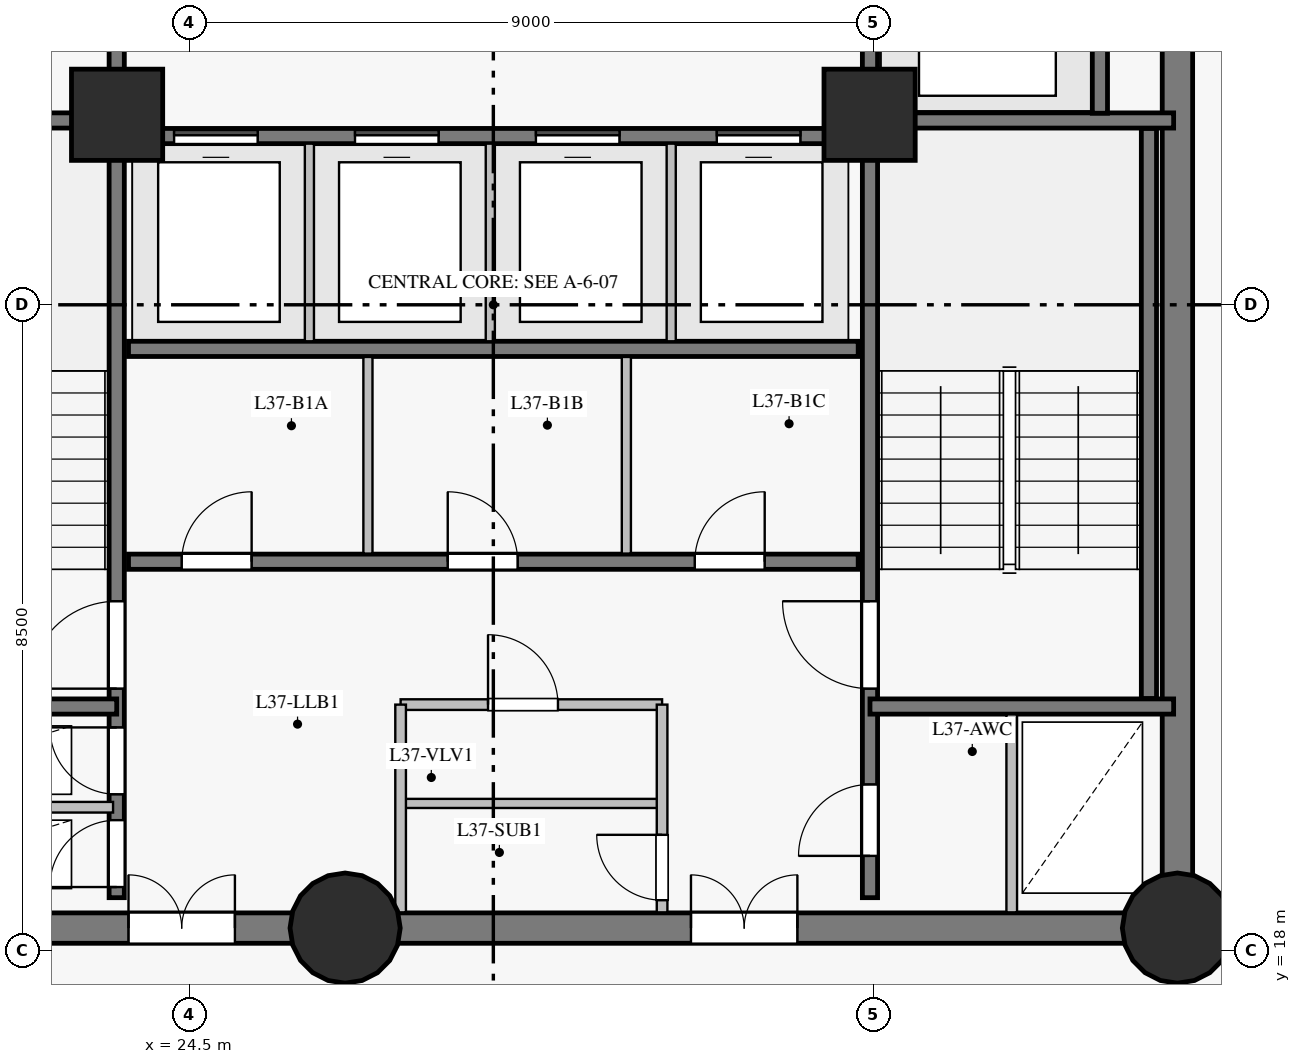
"""IFC4 building model, lengths in metres.
Left out: names, types, materials, properties, quantities, classifications, styles, units other than length and angle.
Written with IfcOpenShell. Run it as: python <this file> out.ifc"""

import sys

from ifc_helpers import new_model, si_unit, direction, frame, frame_2d, origin, origin_with_axes, origin_2d, place, context, subcontext, project, spatial, rectangle, circle, extrude, source, transform, mapped, element, fill, save


model = new_model("IFC4")
c1 = context("Model", 3, precision=1e-05, world=origin(), true_north=direction((0.0, 1.0)))
c2 = subcontext(c1, "Body", "Model", "MODEL_VIEW")
j1 = project(units=[si_unit("LENGTHUNIT", "METRE"), si_unit("PLANEANGLEUNIT", "RADIAN")], contexts=[c1])
p1 = place(None, origin())
s1 = spatial("IfcSite", under=j1, at=p1, CompositionType="ELEMENT")
p2 = place(p1, origin())
s2 = spatial("IfcBuilding", under=s1, at=p2, CompositionType="ELEMENT")
p3 = place(p2, frame((0.0, 0.0, 132.8)))
s3 = spatial("IfcBuildingStorey", under=s2, at=p3, CompositionType="ELEMENT", Elevation=132.8)
p4 = place(p3, frame((19.5, 18.3, 0.0), z_axis=(0.0, 0.0, 1.0), x_axis=(1.0, 0.0, 0.0)))
e1 = element("IfcWall", 1, at=p4, inside=s3, PredefinedType="SHEAR", context=c2, shape_type="SweptSolid", body=[
    extrude(rectangle(XDim=7.05, YDim=0.4, at=frame_2d((3.525, 0.0))), origin(), (0.0, 0.0, 1.0), 2.825),
])
p5 = place(p4, frame((4.2, 0.0, 0.0)))
e2 = element("IfcOpeningElement", 2, at=p5, cuts=e1, PredefinedType="OPENING", context=c2, shape_type="SweptSolid", body=[
    extrude(rectangle(XDim=1.4, YDim=2.2, at=frame_2d((0.7, 1.1))), frame((0.0, 0.21, 0.0), z_axis=(0.0, -1.0, 0.0), x_axis=(1.0, 0.0, 0.0)), (0.0, 0.0, 1.0), 0.42),
])
p6 = place(p3, frame((26.55, 18.3, 0.0), z_axis=(0.0, 0.0, 1.0), x_axis=(1.0, 0.0, 0.0)))
e3 = element("IfcWall", 3, at=p6, inside=s3, PredefinedType="SHEAR", context=c2, shape_type="SweptSolid", body=[
    extrude(rectangle(XDim=10.95, YDim=0.4, at=frame_2d((5.475, 0.0))), origin(), (0.0, 0.0, 1.0), 2.825),
])
p7 = place(p6, frame((4.55, 0.0, 0.0)))
e4 = element("IfcOpeningElement", 4, at=p7, cuts=e3, PredefinedType="OPENING", context=c2, shape_type="SweptSolid", body=[
    extrude(rectangle(XDim=1.4, YDim=2.2, at=frame_2d((0.7, 1.1))), frame((0.0, 0.21, 0.0), z_axis=(0.0, -1.0, 0.0), x_axis=(1.0, 0.0, 0.0)), (0.0, 0.0, 1.0), 0.42),
])
p8 = place(p3, frame((37.5, 18.3, 0.0), z_axis=(0.0, 0.0, 1.0), x_axis=(0.0, 1.0, 0.0)))
e5 = element("IfcWall", 5, at=p8, inside=s3, PredefinedType="SHEAR", context=c2, shape_type="SweptSolid", body=[
    extrude(rectangle(XDim=16.4, YDim=0.4, at=frame_2d((8.2, 0.0))), origin(), (0.0, 0.0, 1.0), 2.825),
])
p9 = place(p8, frame((14.15, 0.0, 0.0)))
e6 = element("IfcOpeningElement", 6, at=p9, cuts=e5, PredefinedType="OPENING", context=c2, shape_type="SweptSolid", body=[
    extrude(rectangle(XDim=1.2, YDim=2.15, at=frame_2d((0.6, 1.075))), frame((0.0, 0.21, 0.0), z_axis=(0.0, -1.0, 0.0), x_axis=(1.0, 0.0, 0.0)), (0.0, 0.0, 1.0), 0.42),
])
m1 = source(origin_with_axes(), c2, "Body", "SweptSolid", [
    extrude(circle(Radius=0.725, at=origin_2d()), origin(), (0.0, 0.0, 1.0), 3.05),
])
for number, where, z_axis, x_axis in (
    (7, (26.55, 18.3, 0.0), (0.0, 0.0, 1.0), (1.0, 0.0, 0.0)),
    (8, (37.5, 18.3, 0.0), (0.0, 0.0, 1.0), (1.0, 0.0, 0.0)),
):
    element("IfcColumn", number, at=place(p3, frame(where, z_axis=z_axis, x_axis=x_axis)), inside=s3, PredefinedType="COLUMN", context=c2, shape_type="MappedRepresentation", body=[
        mapped(m1, transform((0.0, 0.0, 0.0), scale=1.0)),
    ])
m2 = source(origin_with_axes(), c2, "Body", "SweptSolid", [
    extrude(rectangle(XDim=1.2, YDim=1.2, at=origin_2d()), origin(), (0.0, 0.0, 1.0), 3.05),
])
for number, where, z_axis, x_axis in (
    (9, (23.55, 29.0, 0.0), (0.0, 0.0, 1.0), (1.0, 0.0, 0.0)),
    (10, (33.45, 29.0, 0.0), (0.0, 0.0, 1.0), (1.0, 0.0, 0.0)),
):
    element("IfcColumn", number, at=place(p3, frame(where, z_axis=z_axis, x_axis=x_axis)), inside=s3, PredefinedType="COLUMN", context=c2, shape_type="MappedRepresentation", body=[
        mapped(m2, transform((0.0, 0.0, 0.0), scale=1.0)),
    ])
p10 = place(p3, frame((23.545, 18.7, 0.0), z_axis=(0.0, 0.0, 1.0), x_axis=(0.0, 1.0, 0.0)))
e11 = element("IfcWall", 11, at=p10, inside=s3, PredefinedType="SHEAR", context=c2, shape_type="SweptSolid", body=[
    extrude(rectangle(XDim=15.6, YDim=0.2, at=frame_2d((7.8, 0.0))), origin(), (0.0, 0.0, 1.0), 2.825),
])
p11 = place(p10, frame((2.75, 0.0, 0.0)))
e12 = element("IfcOpeningElement", 12, at=p11, cuts=e11, PredefinedType="OPENING", context=c2, shape_type="SweptSolid", body=[
    extrude(rectangle(XDim=1.15, YDim=2.15, at=frame_2d((0.575, 1.075))), frame((0.0, 0.11, 0.0), z_axis=(0.0, -1.0, 0.0), x_axis=(1.0, 0.0, 0.0)), (0.0, 0.0, 1.0), 0.22),
])
p12 = place(p10, frame((0.14, 0.0, 0.0)))
e13 = element("IfcOpeningElement", 13, at=p12, cuts=e11, PredefinedType="OPENING", context=c2, shape_type="SweptSolid", body=[
    extrude(rectangle(XDim=0.88, YDim=2.1, at=frame_2d((0.44, 1.05))), frame((0.0, 0.11, 0.0), z_axis=(0.0, -1.0, 0.0), x_axis=(1.0, 0.0, 0.0)), (0.0, 0.0, 1.0), 0.22),
])
p13 = place(p10, frame((1.36, 0.0, 0.0)))
e14 = element("IfcOpeningElement", 14, at=p13, cuts=e11, PredefinedType="OPENING", context=c2, shape_type="SweptSolid", body=[
    extrude(rectangle(XDim=0.88, YDim=2.1, at=frame_2d((0.44, 1.05))), frame((0.0, 0.11, 0.0), z_axis=(0.0, -1.0, 0.0), x_axis=(1.0, 0.0, 0.0)), (0.0, 0.0, 1.0), 0.22),
])
p14 = place(p10, frame((12.1, 0.0, 0.0)))
e15 = element("IfcOpeningElement", 15, at=p14, cuts=e11, PredefinedType="OPENING", context=c2, shape_type="SweptSolid", body=[
    extrude(rectangle(XDim=1.12, YDim=2.15, at=frame_2d((0.56, 1.075))), frame((0.0, 0.11, 0.0), z_axis=(0.0, -1.0, 0.0), x_axis=(1.0, 0.0, 0.0)), (0.0, 0.0, 1.0), 0.22),
])
p15 = place(p10, frame((14.05, 0.0, 0.0)))
e16 = element("IfcOpeningElement", 16, at=p15, cuts=e11, PredefinedType="OPENING", context=c2, shape_type="SweptSolid", body=[
    extrude(rectangle(XDim=1.12, YDim=2.15, at=frame_2d((0.56, 1.075))), frame((0.0, 0.11, 0.0), z_axis=(0.0, -1.0, 0.0), x_axis=(1.0, 0.0, 0.0)), (0.0, 0.0, 1.0), 0.22),
])
p16 = place(p3, frame((33.455, 18.7, 0.0), z_axis=(0.0, 0.0, 1.0), x_axis=(0.0, 1.0, 0.0)))
e17 = element("IfcWall", 17, at=p16, inside=s3, PredefinedType="SHEAR", context=c2, shape_type="SweptSolid", body=[
    extrude(rectangle(XDim=15.6, YDim=0.2, at=frame_2d((7.8, 0.0))), origin(), (0.0, 0.0, 1.0), 2.825),
])
p17 = place(p16, frame((2.75, 0.0, 0.0)))
e18 = element("IfcOpeningElement", 18, at=p17, cuts=e17, PredefinedType="OPENING", context=c2, shape_type="SweptSolid", body=[
    extrude(rectangle(XDim=1.15, YDim=2.15, at=frame_2d((0.575, 1.075))), frame((0.0, 0.11, 0.0), z_axis=(0.0, -1.0, 0.0), x_axis=(1.0, 0.0, 0.0)), (0.0, 0.0, 1.0), 0.22),
])
p18 = place(p16, frame((0.55, 0.0, 0.0)))
e19 = element("IfcOpeningElement", 19, at=p18, cuts=e17, PredefinedType="OPENING", context=c2, shape_type="SweptSolid", body=[
    extrude(rectangle(XDim=0.94, YDim=2.1, at=frame_2d((0.47, 1.05))), frame((0.0, 0.11, 0.0), z_axis=(0.0, -1.0, 0.0), x_axis=(1.0, 0.0, 0.0)), (0.0, 0.0, 1.0), 0.22),
])
p19 = place(p3, frame((23.7, 23.12, 0.0), z_axis=(0.0, 0.0, 1.0), x_axis=(1.0, 0.0, 0.0)))
e20 = element("IfcWall", 20, at=p19, inside=s3, PredefinedType="SHEAR", context=c2, shape_type="SweptSolid", body=[
    extrude(rectangle(XDim=9.6, YDim=0.2, at=frame_2d((4.8, 0.0))), origin(), (0.0, 0.0, 1.0), 2.825),
])
p20 = place(p19, frame((0.7, 0.0, 0.0)))
e21 = element("IfcOpeningElement", 21, at=p20, cuts=e20, PredefinedType="OPENING", context=c2, shape_type="SweptSolid", body=[
    extrude(rectangle(XDim=0.92, YDim=2.1, at=frame_2d((0.46, 1.05))), frame((0.0, 0.11, 0.0), z_axis=(0.0, -1.0, 0.0), x_axis=(1.0, 0.0, 0.0)), (0.0, 0.0, 1.0), 0.22),
])
p21 = place(p19, frame((4.2, 0.0, 0.0)))
e22 = element("IfcOpeningElement", 22, at=p21, cuts=e20, PredefinedType="OPENING", context=c2, shape_type="SweptSolid", body=[
    extrude(rectangle(XDim=0.92, YDim=2.1, at=frame_2d((0.46, 1.05))), frame((0.0, 0.11, 0.0), z_axis=(0.0, -1.0, 0.0), x_axis=(1.0, 0.0, 0.0)), (0.0, 0.0, 1.0), 0.22),
])
p22 = place(p19, frame((7.45, 0.0, 0.0)))
e23 = element("IfcOpeningElement", 23, at=p22, cuts=e20, PredefinedType="OPENING", context=c2, shape_type="SweptSolid", body=[
    extrude(rectangle(XDim=0.92, YDim=2.1, at=frame_2d((0.46, 1.05))), frame((0.0, 0.11, 0.0), z_axis=(0.0, -1.0, 0.0), x_axis=(1.0, 0.0, 0.0)), (0.0, 0.0, 1.0), 0.22),
])
p23 = place(p3, frame((23.7, 25.92, 0.0), z_axis=(0.0, 0.0, 1.0), x_axis=(1.0, 0.0, 0.0)))
e24 = element("IfcWall", 24, at=p23, inside=s3, PredefinedType="SHEAR", context=c2, shape_type="SweptSolid", body=[
    extrude(rectangle(XDim=9.6, YDim=0.2, at=frame_2d((4.8, 0.0))), origin(), (0.0, 0.0, 1.0), 2.825),
])
p24 = place(p3, frame((23.7, 28.72, 0.0), z_axis=(0.0, 0.0, 1.0), x_axis=(1.0, 0.0, 0.0)))
e25 = element("IfcWall", 25, at=p24, inside=s3, PredefinedType="SHEAR", context=c2, shape_type="SweptSolid", body=[
    extrude(rectangle(XDim=9.6, YDim=0.2, at=frame_2d((4.8, 0.0))), origin(), (0.0, 0.0, 1.0), 2.825),
])
p25 = place(p24, frame((0.6, 0.0, 0.0)))
e26 = element("IfcOpeningElement", 26, at=p25, cuts=e25, PredefinedType="OPENING", context=c2, shape_type="SweptSolid", body=[
    extrude(rectangle(XDim=1.1, YDim=2.15, at=frame_2d((0.55, 1.075))), frame((0.0, 0.11, 0.0), z_axis=(0.0, -1.0, 0.0), x_axis=(1.0, 0.0, 0.0)), (0.0, 0.0, 1.0), 0.22),
])
p26 = place(p24, frame((2.98, 0.0, 0.0)))
e27 = element("IfcOpeningElement", 27, at=p26, cuts=e25, PredefinedType="OPENING", context=c2, shape_type="SweptSolid", body=[
    extrude(rectangle(XDim=1.1, YDim=2.15, at=frame_2d((0.55, 1.075))), frame((0.0, 0.11, 0.0), z_axis=(0.0, -1.0, 0.0), x_axis=(1.0, 0.0, 0.0)), (0.0, 0.0, 1.0), 0.22),
])
p27 = place(p24, frame((5.36, 0.0, 0.0)))
e28 = element("IfcOpeningElement", 28, at=p27, cuts=e25, PredefinedType="OPENING", context=c2, shape_type="SweptSolid", body=[
    extrude(rectangle(XDim=1.1, YDim=2.15, at=frame_2d((0.55, 1.075))), frame((0.0, 0.11, 0.0), z_axis=(0.0, -1.0, 0.0), x_axis=(1.0, 0.0, 0.0)), (0.0, 0.0, 1.0), 0.22),
])
p28 = place(p24, frame((7.74, 0.0, 0.0)))
e29 = element("IfcOpeningElement", 29, at=p28, cuts=e25, PredefinedType="OPENING", context=c2, shape_type="SweptSolid", body=[
    extrude(rectangle(XDim=1.1, YDim=2.15, at=frame_2d((0.55, 1.075))), frame((0.0, 0.11, 0.0), z_axis=(0.0, -1.0, 0.0), x_axis=(1.0, 0.0, 0.0)), (0.0, 0.0, 1.0), 0.22),
])
p29 = place(p3, frame((37.125, 21.32, 0.0), z_axis=(0.0, 0.0, 1.0), x_axis=(0.0, 1.0, 0.0)))
e30 = element("IfcWall", 30, at=p29, inside=s3, PredefinedType="SHEAR", context=c2, shape_type="SweptSolid", body=[
    extrude(rectangle(XDim=7.5, YDim=0.2, at=frame_2d((3.75, 0.0))), origin(), (0.0, 0.0, 1.0), 2.825),
])
for number, where, z_axis, x_axis in (
    (31, (33.455, 21.215, 0.0), (0.0, 0.0, 1.0), (1.0, 0.0, 0.0)),
    (32, (33.455, 28.925, 0.0), (0.0, 0.0, 1.0), (1.0, 0.0, 0.0)),
    (33, (19.55, 21.215, 0.0), (0.0, 0.0, 1.0), (1.0, 0.0, 0.0)),
    (34, (19.55, 28.925, 0.0), (0.0, 0.0, 1.0), (1.0, 0.0, 0.0)),
):
    element("IfcWall", number, at=place(p3, frame(where, z_axis=z_axis, x_axis=x_axis)), inside=s3, PredefinedType="SHEAR", context=c2, shape_type="SweptSolid", body=[
        extrude(rectangle(XDim=3.995, YDim=0.2, at=frame_2d((1.998, 0.0))), origin(), (0.0, 0.0, 1.0), 2.825),
    ])
p30 = place(p3, frame((36.48, 29.02, 0.0), z_axis=(0.0, 0.0, 1.0), x_axis=(0.0, 1.0, 0.0)))
e35 = element("IfcWall", 35, at=p30, inside=s3, PredefinedType="SHEAR", context=c2, shape_type="SweptSolid", body=[
    extrude(rectangle(XDim=2.86, YDim=0.2, at=frame_2d((1.43, 0.0))), origin(), (0.0, 0.0, 1.0), 2.825),
])
p31 = place(p3, frame((19.707, 19.89, 0.0), z_axis=(0.0, 0.0, 1.0), x_axis=(1.0, 0.0, 0.0)))
e36 = element("IfcWall", 36, at=p31, inside=s3, PredefinedType="PARTITIONING", context=c2, shape_type="SweptSolid", body=[
    extrude(rectangle(XDim=3.79, YDim=0.14, at=frame_2d((1.895, 0.0))), origin(), (0.0, 0.0, 1.0), 2.825),
])
p32 = place(p3, frame((27.28, 21.24, 0.0), z_axis=(0.0, 0.0, 1.0), x_axis=(1.0, 0.0, 0.0)))
e37 = element("IfcWall", 37, at=p32, inside=s3, PredefinedType="PARTITIONING", context=c2, shape_type="SweptSolid", body=[
    extrude(rectangle(XDim=3.44, YDim=0.14, at=frame_2d((1.72, 0.0))), origin(), (0.0, 0.0, 1.0), 2.825),
])
p33 = place(p32, frame((1.15, 0.0, 0.0)))
e38 = element("IfcOpeningElement", 38, at=p33, cuts=e37, PredefinedType="OPENING", context=c2, shape_type="SweptSolid", body=[
    extrude(rectangle(XDim=0.92, YDim=2.1, at=frame_2d((0.46, 1.05))), frame((0.0, 0.08, 0.0), z_axis=(0.0, -1.0, 0.0), x_axis=(1.0, 0.0, 0.0)), (0.0, 0.0, 1.0), 0.16),
])
p34 = place(p3, frame((27.28, 19.94, 0.0), z_axis=(0.0, 0.0, 1.0), x_axis=(1.0, 0.0, 0.0)))
e39 = element("IfcWall", 39, at=p34, inside=s3, PredefinedType="PARTITIONING", context=c2, shape_type="SweptSolid", body=[
    extrude(rectangle(XDim=3.44, YDim=0.12, at=frame_2d((1.72, 0.0))), origin(), (0.0, 0.0, 1.0), 2.825),
])
p35 = place(p3, frame((27.28, 18.507, 0.0), z_axis=(0.0, 0.0, 1.0), x_axis=(0.0, 1.0, 0.0)))
e40 = element("IfcWall", 40, at=p35, inside=s3, PredefinedType="PARTITIONING", context=c2, shape_type="SweptSolid", body=[
    extrude(rectangle(XDim=2.733, YDim=0.14, at=frame_2d((1.366, 0.0))), origin(), (0.0, 0.0, 1.0), 2.825),
])
p36 = place(p3, frame((30.72, 18.507, 0.0), z_axis=(0.0, 0.0, 1.0), x_axis=(0.0, 1.0, 0.0)))
e41 = element("IfcWall", 41, at=p36, inside=s3, PredefinedType="PARTITIONING", context=c2, shape_type="SweptSolid", body=[
    extrude(rectangle(XDim=2.733, YDim=0.14, at=frame_2d((1.366, 0.0))), origin(), (0.0, 0.0, 1.0), 2.825),
])
p37 = place(p36, frame((0.16, 0.0, 0.0)))
e42 = element("IfcOpeningElement", 42, at=p37, cuts=e41, PredefinedType="OPENING", context=c2, shape_type="SweptSolid", body=[
    extrude(rectangle(XDim=0.86, YDim=2.1, at=frame_2d((0.43, 1.05))), frame((0.0, 0.08, 0.0), z_axis=(0.0, -1.0, 0.0), x_axis=(1.0, 0.0, 0.0)), (0.0, 0.0, 1.0), 0.16),
])
for number, where, z_axis, x_axis in (
    (43, (26.08, 26.02, 0.0), (0.0, 0.0, 1.0), (0.0, 1.0, 0.0)),
    (44, (28.46, 26.02, 0.0), (0.0, 0.0, 1.0), (0.0, 1.0, 0.0)),
    (45, (30.84, 26.02, 0.0), (0.0, 0.0, 1.0), (0.0, 1.0, 0.0)),
):
    element("IfcWall", number, at=place(p3, frame(where, z_axis=z_axis, x_axis=x_axis)), inside=s3, PredefinedType="PARTITIONING", context=c2, shape_type="SweptSolid", body=[
        extrude(rectangle(XDim=2.6, YDim=0.12, at=frame_2d((1.3, 0.0))), origin(), (0.0, 0.0, 1.0), 2.825),
    ])
for number, where, z_axis, x_axis in (
    (46, (26.85, 23.227, 0.0), (0.0, 0.0, 1.0), (0.0, 1.0, 0.0)),
    (47, (30.25, 23.227, 0.0), (0.0, 0.0, 1.0), (0.0, 1.0, 0.0)),
):
    element("IfcWall", number, at=place(p3, frame(where, z_axis=z_axis, x_axis=x_axis)), inside=s3, PredefinedType="PARTITIONING", context=c2, shape_type="SweptSolid", body=[
        extrude(rectangle(XDim=2.587, YDim=0.12, at=frame_2d((1.293, 0.0))), origin(), (0.0, 0.0, 1.0), 2.825),
    ])
p38 = place(p3, frame((35.32, 18.507, 0.0), z_axis=(0.0, 0.0, 1.0), x_axis=(0.0, 1.0, 0.0)))
e48 = element("IfcWall", 48, at=p38, inside=s3, PredefinedType="PARTITIONING", context=c2, shape_type="SweptSolid", body=[
    extrude(rectangle(XDim=2.604, YDim=0.14, at=frame_2d((1.302, 0.0))), origin(), (0.0, 0.0, 1.0), 2.825),
])
m3 = source(origin_with_axes(), c2, "Body", "SweptSolid", [
    extrude(rectangle(XDim=1.15, YDim=2.15, at=frame_2d((0.575, 1.075))), frame((0.0, 0.025, 0.0), z_axis=(0.0, -1.0, 0.0), x_axis=(1.0, 0.0, 0.0)), (0.0, 0.0, 1.0), 0.05),
])
p39 = place(p11, origin())
e49 = element("IfcDoor", 49, at=p39, inside=s3, OperationType="SINGLE_SWING_LEFT", PredefinedType="DOOR", context=c2, shape_type="MappedRepresentation", body=[
    mapped(m3, transform((0.0, 0.0, 0.0), scale=1.0)),
])
fill(e12, e49)
p40 = place(p17, origin())
e50 = element("IfcDoor", 50, at=p40, inside=s3, OperationType="SINGLE_SWING_RIGHT", PredefinedType="DOOR", context=c2, shape_type="MappedRepresentation", body=[
    mapped(m3, transform((0.0, 0.0, 0.0), scale=1.0)),
])
fill(e18, e50)
m4 = source(origin_with_axes(), c2, "Body", "SweptSolid", [
    extrude(rectangle(XDim=0.88, YDim=2.1, at=frame_2d((0.44, 1.05))), frame((0.0, 0.025, 0.0), z_axis=(0.0, -1.0, 0.0), x_axis=(1.0, 0.0, 0.0)), (0.0, 0.0, 1.0), 0.05),
])
p41 = place(p12, origin())
e51 = element("IfcDoor", 51, at=p41, inside=s3, OperationType="SINGLE_SWING_LEFT", PredefinedType="DOOR", context=c2, shape_type="MappedRepresentation", body=[
    mapped(m4, transform((0.0, 0.0, 0.0), scale=1.0)),
])
fill(e13, e51)
p42 = place(p13, origin())
e52 = element("IfcDoor", 52, at=p42, inside=s3, OperationType="SINGLE_SWING_RIGHT", PredefinedType="DOOR", context=c2, shape_type="MappedRepresentation", body=[
    mapped(m4, transform((0.0, 0.0, 0.0), scale=1.0)),
])
fill(e14, e52)
m5 = source(origin_with_axes(), c2, "Body", "SweptSolid", [
    extrude(rectangle(XDim=1.4, YDim=2.2, at=frame_2d((0.7, 1.1))), frame((0.0, 0.025, 0.0), z_axis=(0.0, -1.0, 0.0), x_axis=(1.0, 0.0, 0.0)), (0.0, 0.0, 1.0), 0.05),
])
p43 = place(p5, origin())
e53 = element("IfcDoor", 53, at=p43, inside=s3, OperationType="DOUBLE_DOOR_SINGLE_SWING", PredefinedType="DOOR", context=c2, shape_type="MappedRepresentation", body=[
    mapped(m5, transform((0.0, 0.0, 0.0), scale=1.0)),
])
fill(e2, e53)
p44 = place(p7, origin())
e54 = element("IfcDoor", 54, at=p44, inside=s3, OperationType="DOUBLE_DOOR_SINGLE_SWING", PredefinedType="DOOR", context=c2, shape_type="MappedRepresentation", body=[
    mapped(m5, transform((0.0, 0.0, 0.0), scale=1.0)),
])
fill(e4, e54)
m6 = source(origin_with_axes(), c2, "Body", "SweptSolid", [
    extrude(rectangle(XDim=0.94, YDim=2.1, at=frame_2d((0.47, 1.05))), frame((0.0, 0.025, 0.0), z_axis=(0.0, -1.0, 0.0), x_axis=(1.0, 0.0, 0.0)), (0.0, 0.0, 1.0), 0.05),
])
p45 = place(p18, origin())
e55 = element("IfcDoor", 55, at=p45, inside=s3, OperationType="SINGLE_SWING_LEFT", PredefinedType="DOOR", context=c2, shape_type="MappedRepresentation", body=[
    mapped(m6, transform((0.0, 0.0, 0.0), scale=1.0)),
])
fill(e19, e55)
m7 = source(origin_with_axes(), c2, "Body", "SweptSolid", [
    extrude(rectangle(XDim=0.86, YDim=2.1, at=frame_2d((0.43, 1.05))), frame((0.0, 0.025, 0.0), z_axis=(0.0, -1.0, 0.0), x_axis=(1.0, 0.0, 0.0)), (0.0, 0.0, 1.0), 0.05),
])
p46 = place(p37, origin())
e56 = element("IfcDoor", 56, at=p46, inside=s3, OperationType="SINGLE_SWING_RIGHT", PredefinedType="DOOR", context=c2, shape_type="MappedRepresentation", body=[
    mapped(m7, transform((0.0, 0.0, 0.0), scale=1.0)),
])
fill(e42, e56)
m8 = source(origin_with_axes(), c2, "Body", "SweptSolid", [
    extrude(rectangle(XDim=0.92, YDim=2.1, at=frame_2d((0.46, 1.05))), frame((0.0, 0.025, 0.0), z_axis=(0.0, -1.0, 0.0), x_axis=(1.0, 0.0, 0.0)), (0.0, 0.0, 1.0), 0.05),
])
p47 = place(p33, origin())
e57 = element("IfcDoor", 57, at=p47, inside=s3, OperationType="SINGLE_SWING_LEFT", PredefinedType="DOOR", context=c2, shape_type="MappedRepresentation", body=[
    mapped(m8, transform((0.0, 0.0, 0.0), scale=1.0)),
])
fill(e38, e57)
p48 = place(p20, origin())
e58 = element("IfcDoor", 58, at=p48, inside=s3, OperationType="SINGLE_SWING_RIGHT", PredefinedType="DOOR", context=c2, shape_type="MappedRepresentation", body=[
    mapped(m8, transform((0.0, 0.0, 0.0), scale=1.0)),
])
fill(e21, e58)
p49 = place(p21, origin())
e59 = element("IfcDoor", 59, at=p49, inside=s3, OperationType="SINGLE_SWING_LEFT", PredefinedType="DOOR", context=c2, shape_type="MappedRepresentation", body=[
    mapped(m8, transform((0.0, 0.0, 0.0), scale=1.0)),
])
fill(e22, e59)
p50 = place(p22, origin())
e60 = element("IfcDoor", 60, at=p50, inside=s3, OperationType="SINGLE_SWING_RIGHT", PredefinedType="DOOR", context=c2, shape_type="MappedRepresentation", body=[
    mapped(m8, transform((0.0, 0.0, 0.0), scale=1.0)),
])
fill(e23, e60)
m9 = source(origin_with_axes(), c2, "Body", "SweptSolid", [
    extrude(rectangle(XDim=1.1, YDim=2.15, at=frame_2d((0.55, 1.075))), frame((0.0, 0.025, 0.0), z_axis=(0.0, -1.0, 0.0), x_axis=(1.0, 0.0, 0.0)), (0.0, 0.0, 1.0), 0.05),
])
p51 = place(p25, origin())
e61 = element("IfcDoor", 61, at=p51, inside=s3, OperationType="SLIDING_TO_LEFT", PredefinedType="DOOR", context=c2, shape_type="MappedRepresentation", body=[
    mapped(m9, transform((0.0, 0.0, 0.0), scale=1.0)),
])
fill(e26, e61)
p52 = place(p26, origin())
e62 = element("IfcDoor", 62, at=p52, inside=s3, OperationType="SLIDING_TO_RIGHT", PredefinedType="DOOR", context=c2, shape_type="MappedRepresentation", body=[
    mapped(m9, transform((0.0, 0.0, 0.0), scale=1.0)),
])
fill(e27, e62)
p53 = place(p27, origin())
e63 = element("IfcDoor", 63, at=p53, inside=s3, OperationType="SLIDING_TO_LEFT", PredefinedType="DOOR", context=c2, shape_type="MappedRepresentation", body=[
    mapped(m9, transform((0.0, 0.0, 0.0), scale=1.0)),
])
fill(e28, e63)
p54 = place(p28, origin())
e64 = element("IfcDoor", 64, at=p54, inside=s3, OperationType="SLIDING_TO_RIGHT", PredefinedType="DOOR", context=c2, shape_type="MappedRepresentation", body=[
    mapped(m9, transform((0.0, 0.0, 0.0), scale=1.0)),
])
fill(e29, e64)
save(model, sys.argv[1])
